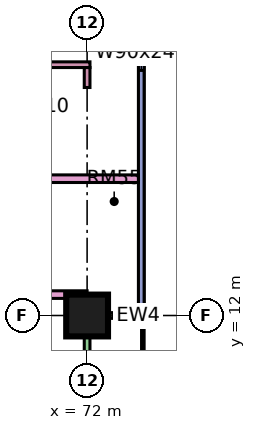
"""IFC4 building model, lengths in metres.
Left out: names, types, materials, properties, quantities, classifications, styles, units other than length and angle.
Written with IfcOpenShell. Run it as: python <this file> out.ifc"""

import sys

from ifc_helpers import new_model, si_unit, direction, frame, frame_2d, origin, origin_2d, place, context, subcontext, project, spatial, rectangle, extrude, element, fill, save


model = new_model("IFC4")
c1 = context("Model", 3, precision=1e-05, world=origin(), true_north=direction((0.0, 1.0)))
c2 = subcontext(c1, "Body", "Model", "MODEL_VIEW")
j1 = project(units=[si_unit("LENGTHUNIT", "METRE"), si_unit("PLANEANGLEUNIT", "RADIAN")], contexts=[c1])
p1 = place(None, origin())
s1 = spatial("IfcSite", under=j1, at=p1, CompositionType="ELEMENT")
p2 = place(p1, origin())
s2 = spatial("IfcBuilding", under=s1, at=p2, CompositionType="ELEMENT")
p3 = place(p2, frame((0.0, 0.0, 78.9)))
s3 = spatial("IfcBuildingStorey", under=s2, at=p3, CompositionType="ELEMENT", Elevation=78.9)
p4 = place(p3, frame((72.0, 12.0, 0.0), z_axis=(0.0, 0.0, 1.0), x_axis=(1.0, 0.0, 0.0)))
e1 = element("IfcColumn", 1, at=p4, inside=s3, PredefinedType="COLUMN", context=c2, shape_type="SweptSolid", body=[
    extrude(rectangle(XDim=1.1, YDim=1.1, at=origin_2d()), origin(), (0.0, 0.0, 1.0), 3.75),
])
p5 = place(p3, frame((72.0, 1.575, 0.0), z_axis=(0.0, 0.0, 1.0), x_axis=(0.0, 1.0, 0.0)))
e2 = element("IfcWall", 2, at=p5, inside=s3, PredefinedType="SOLIDWALL", context=c2, shape_type="SweptSolid", body=[
    extrude(rectangle(XDim=10.35, YDim=0.15, at=frame_2d((5.175, 0.0))), origin(), (0.0, 0.0, 1.0), 3.35),
])
p6 = place(p5, frame((1.887, 0.0, 0.0)))
e3 = element("IfcOpeningElement", 3, at=p6, cuts=e2, PredefinedType="OPENING", context=c2, shape_type="SweptSolid", body=[
    extrude(rectangle(XDim=1.8, YDim=2.4, at=frame_2d((0.9, 1.2))), frame((0.0, 0.085, 0.0), z_axis=(0.0, -1.0, 0.0), x_axis=(1.0, 0.0, 0.0)), (0.0, 0.0, 1.0), 0.17),
])
p7 = place(p5, frame((7.675, 0.0, 1.7)))
e4 = element("IfcOpeningElement", 4, at=p7, cuts=e2, PredefinedType="OPENING", context=c2, shape_type="SweptSolid", body=[
    extrude(rectangle(XDim=1.2, YDim=0.9, at=frame_2d((0.6, 0.45))), frame((0.0, 0.085, 0.0), z_axis=(0.0, -1.0, 0.0), x_axis=(1.0, 0.0, 0.0)), (0.0, 0.0, 1.0), 0.17),
])
p8 = place(p3, frame((73.5, 12.0, 0.0), z_axis=(0.0, 0.0, 1.0), x_axis=(-1.0, 0.0, 0.0)))
e5 = element("IfcWall", 5, at=p8, inside=s3, PredefinedType="SOLIDWALL", context=c2, shape_type="SweptSolid", body=[
    extrude(rectangle(XDim=1.5, YDim=0.15, at=frame_2d((0.75, 0.0))), origin(), (0.0, 0.0, 1.0), 3.35),
])
p9 = place(p3, frame((73.425, 12.075, 0.0), z_axis=(0.0, 0.0, 1.0), x_axis=(0.0, 1.0, 0.0)))
e6 = element("IfcWall", 6, at=p9, inside=s3, PredefinedType="SOLIDWALL", context=c2, shape_type="SweptSolid", body=[
    extrude(rectangle(XDim=10.425, YDim=0.15, at=frame_2d((5.212, 0.0))), origin(), (0.0, 0.0, 1.0), 3.35),
])
p10 = place(p9, frame((6.375, 0.0, 0.45)))
e7 = element("IfcOpeningElement", 7, at=p10, cuts=e6, PredefinedType="OPENING", context=c2, shape_type="SweptSolid", body=[
    extrude(rectangle(XDim=0.9, YDim=2.4, at=frame_2d((0.45, 1.2))), frame((0.0, 0.085, 0.0), z_axis=(0.0, -1.0, 0.0), x_axis=(1.0, 0.0, 0.0)), (0.0, 0.0, 1.0), 0.17),
])
p11 = place(p9, frame((8.175, 0.0, 0.45)))
e8 = element("IfcOpeningElement", 8, at=p11, cuts=e6, PredefinedType="OPENING", context=c2, shape_type="SweptSolid", body=[
    extrude(rectangle(XDim=1.8, YDim=2.4, at=frame_2d((0.9, 1.2))), frame((0.0, 0.085, 0.0), z_axis=(0.0, -1.0, 0.0), x_axis=(1.0, 0.0, 0.0)), (0.0, 0.0, 1.0), 0.17),
])
p12 = place(p3, frame((51.225, 15.6, 0.0), z_axis=(0.0, 0.0, 1.0), x_axis=(1.0, 0.0, 0.0)))
e9 = element("IfcWall", 9, at=p12, inside=s3, PredefinedType="PARTITIONING", context=c2, shape_type="SweptSolid", body=[
    extrude(rectangle(XDim=22.125, YDim=0.2, at=frame_2d((11.062, 0.0))), origin(), (0.0, 0.0, 1.0), 3.35),
])
p13 = place(p12, frame((12.425, 0.0, 0.0)))
e10 = element("IfcOpeningElement", 10, at=p13, cuts=e9, PredefinedType="OPENING", context=c2, shape_type="SweptSolid", body=[
    extrude(rectangle(XDim=1.0, YDim=2.1, at=frame_2d((0.5, 1.05))), frame((0.0, 0.11, 0.0), z_axis=(0.0, -1.0, 0.0), x_axis=(1.0, 0.0, 0.0)), (0.0, 0.0, 1.0), 0.22),
])
p14 = place(p12, frame((0.875, 0.0, 0.0)))
e11 = element("IfcOpeningElement", 11, at=p14, cuts=e9, PredefinedType="OPENING", context=c2, shape_type="SweptSolid", body=[
    extrude(rectangle(XDim=1.0, YDim=2.1, at=frame_2d((0.5, 1.05))), frame((0.0, 0.11, 0.0), z_axis=(0.0, -1.0, 0.0), x_axis=(1.0, 0.0, 0.0)), (0.0, 0.0, 1.0), 0.22),
])
p15 = place(p3, frame((65.325, 18.6, 0.0), z_axis=(0.0, 0.0, 1.0), x_axis=(1.0, 0.0, 0.0)))
e12 = element("IfcWall", 12, at=p15, inside=s3, PredefinedType="PARTITIONING", context=c2, shape_type="SweptSolid", body=[
    extrude(rectangle(XDim=6.75, YDim=0.15, at=frame_2d((3.375, 0.0))), origin(), (0.0, 0.0, 1.0), 3.35),
])
p16 = place(p15, frame((4.725, 0.0, 0.0)))
e13 = element("IfcOpeningElement", 13, at=p16, cuts=e12, PredefinedType="OPENING", context=c2, shape_type="SweptSolid", body=[
    extrude(rectangle(XDim=0.8, YDim=2.1, at=frame_2d((0.4, 1.05))), frame((0.0, 0.085, 0.0), z_axis=(0.0, -1.0, 0.0), x_axis=(1.0, 0.0, 0.0)), (0.0, 0.0, 1.0), 0.17),
])
p17 = place(p15, frame((1.425, 0.0, 0.0)))
e14 = element("IfcOpeningElement", 14, at=p17, cuts=e12, PredefinedType="OPENING", context=c2, shape_type="SweptSolid", body=[
    extrude(rectangle(XDim=0.8, YDim=2.1, at=frame_2d((0.4, 1.05))), frame((0.0, 0.085, 0.0), z_axis=(0.0, -1.0, 0.0), x_axis=(1.0, 0.0, 0.0)), (0.0, 0.0, 1.0), 0.17),
])
p18 = place(p3, frame((69.0, 12.55, 0.0), z_axis=(0.0, 0.0, 1.0), x_axis=(1.0, 0.0, 0.0)))
e15 = element("IfcWall", 15, at=p18, inside=s3, PredefinedType="PARTITIONING", context=c2, shape_type="SweptSolid", body=[
    extrude(rectangle(XDim=3.0, YDim=0.2, at=frame_2d((1.5, 0.0))), origin(), (0.0, 0.0, 1.0), 3.35),
])
p19 = place(p3, frame((72.0, 18.0, 0.0), z_axis=(0.0, 0.0, 1.0), x_axis=(0.0, 1.0, 0.0)))
e16 = element("IfcWall", 16, at=p19, inside=s3, PredefinedType="PARTITIONING", context=c2, shape_type="SweptSolid", body=[
    extrude(rectangle(XDim=0.525, YDim=0.15, at=frame_2d((0.262, 0.0))), origin(), (0.0, 0.0, 1.0), 3.35),
])
p20 = place(p10, origin())
e17 = element("IfcWindow", 17, at=p20, inside=s3, PartitioningType="SINGLE_PANEL", PredefinedType="WINDOW", context=c2, shape_type="SweptSolid", body=[
    extrude(rectangle(XDim=0.9, YDim=2.4, at=frame_2d((0.45, 1.2))), frame((0.0, 0.03, 0.0), z_axis=(0.0, -1.0, 0.0), x_axis=(1.0, 0.0, 0.0)), (0.0, 0.0, 1.0), 0.06),
])
fill(e7, e17)
save(model, sys.argv[1])
